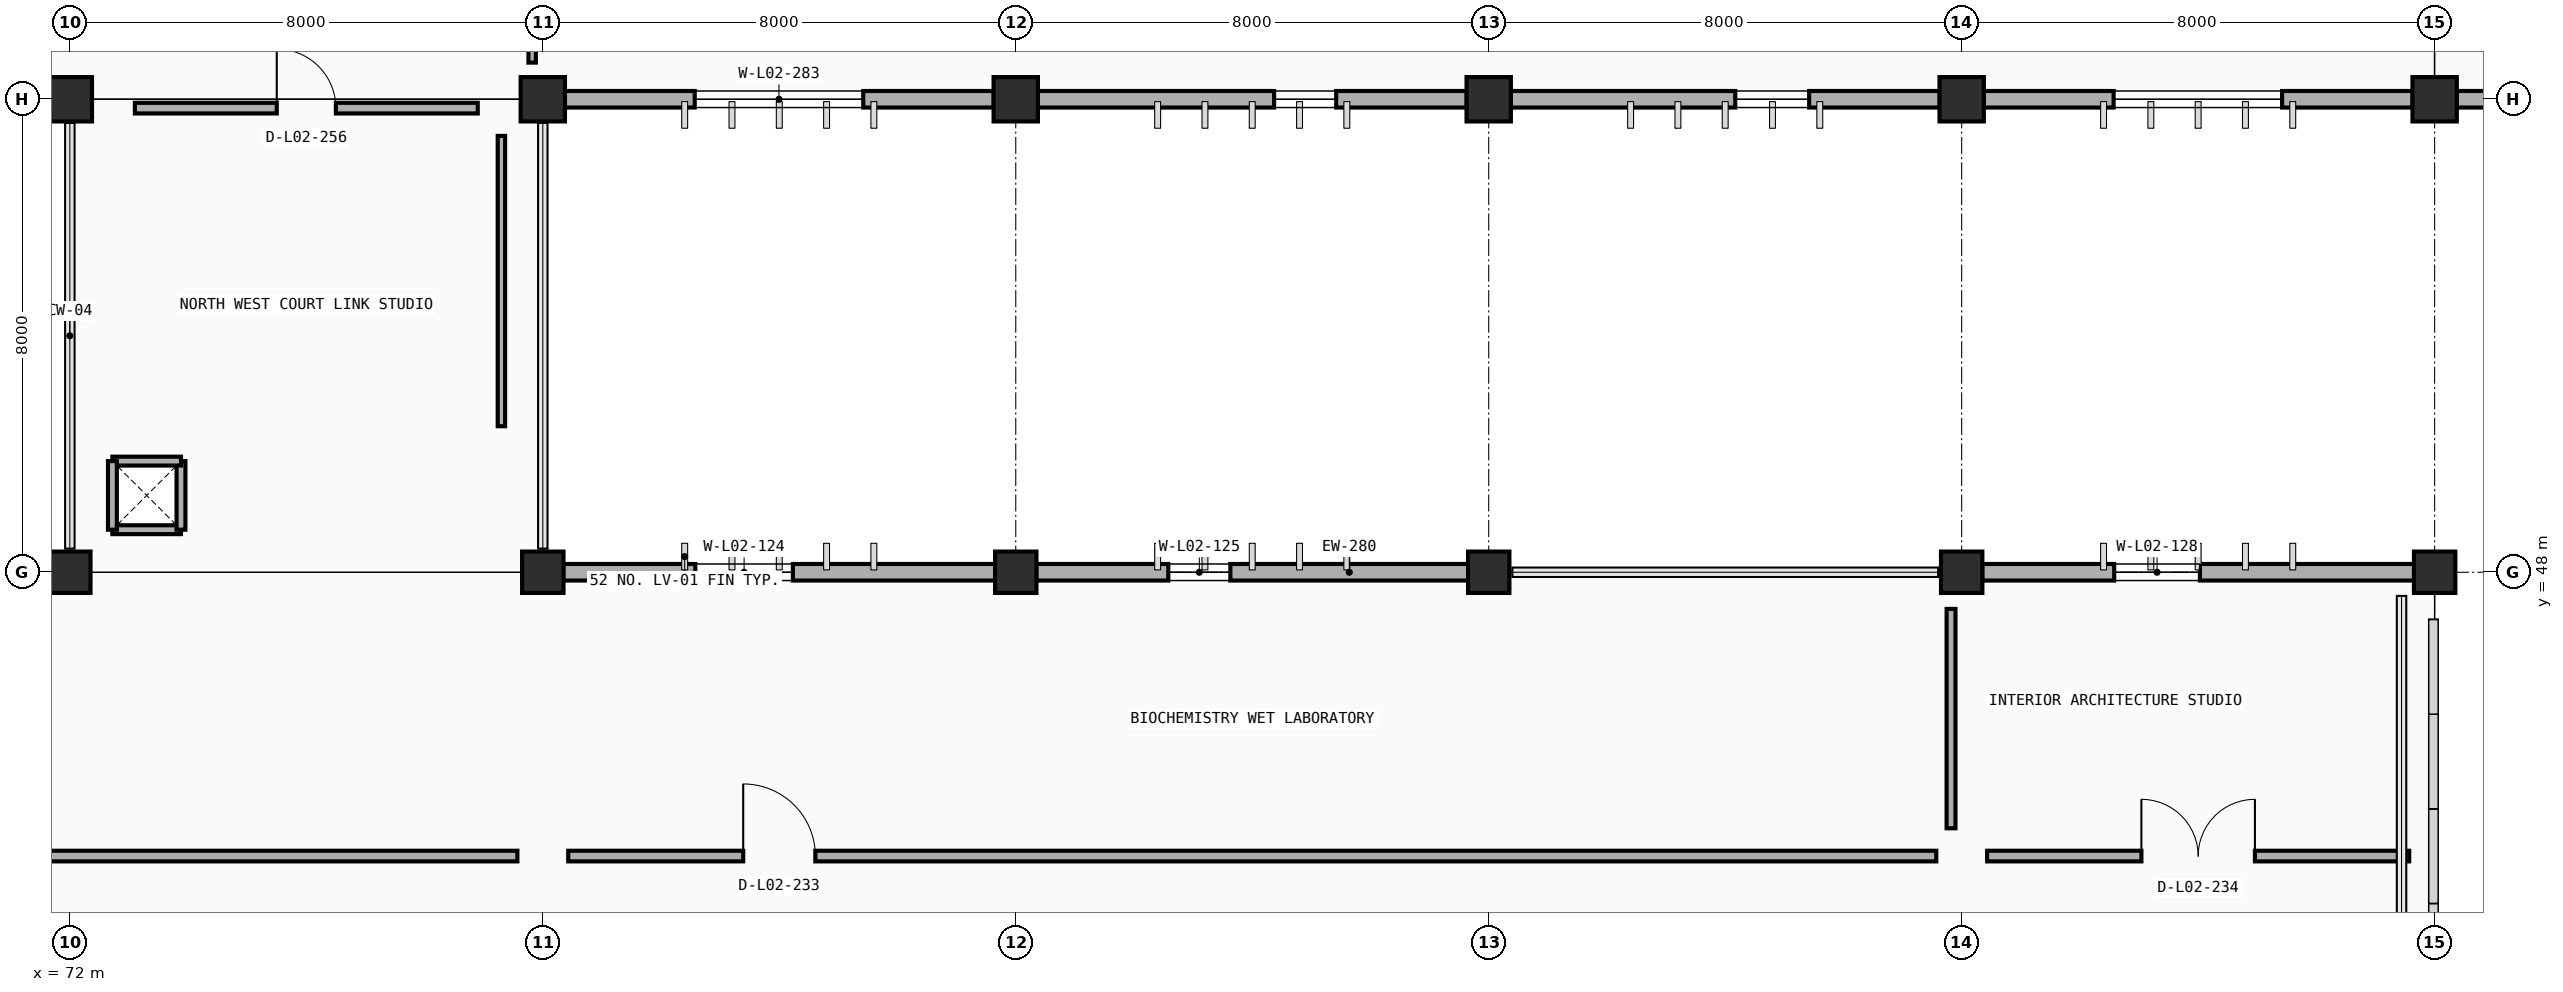
"""IFC4 building model, lengths in metres.
Left out: names, types, materials, properties, quantities, classifications, styles, units other than length and angle.
Written with IfcOpenShell. Run it as: python <this file> out.ifc"""

import sys

from ifc_helpers import new_model, si_unit, direction, frame, frame_2d, origin, origin_2d, place, context, subcontext, project, spatial, rectangle, extrude, element, fill, save


model = new_model("IFC4")
c1 = context("Model", 3, precision=1e-05, world=origin(), true_north=direction((0.0, 1.0)))
c2 = subcontext(c1, "Body", "Model", "MODEL_VIEW")
j1 = project(units=[si_unit("LENGTHUNIT", "METRE"), si_unit("PLANEANGLEUNIT", "RADIAN")], contexts=[c1])
p1 = place(None, origin())
s1 = spatial("IfcSite", under=j1, at=p1, CompositionType="ELEMENT")
p2 = place(p1, origin())
s2 = spatial("IfcBuilding", under=s1, at=p2, CompositionType="ELEMENT")
p3 = place(p2, frame((0.0, 0.0, 4.8)))
s3 = spatial("IfcBuildingStorey", under=s2, at=p3, CompositionType="ELEMENT", Elevation=4.8)
for number, where, z_axis, x_axis in (
    (1, (72.0, 48.0, 0.0), (0.0, 0.0, 1.0), (1.0, 0.0, 0.0)),
    (2, (80.0, 48.0, 0.0), (0.0, 0.0, 1.0), (1.0, 0.0, 0.0)),
    (3, (88.0, 48.0, 0.0), (0.0, 0.0, 1.0), (1.0, 0.0, 0.0)),
    (4, (96.0, 48.0, 0.0), (0.0, 0.0, 1.0), (1.0, 0.0, 0.0)),
    (5, (104.0, 48.0, 0.0), (0.0, 0.0, 1.0), (1.0, 0.0, 0.0)),
    (6, (112.0, 48.0, 0.0), (0.0, 0.0, 1.0), (1.0, 0.0, 0.0)),
):
    element("IfcColumn", number, at=place(p3, frame(where, z_axis=z_axis, x_axis=x_axis)), inside=s3, PredefinedType="COLUMN", context=c2, shape_type="SweptSolid", body=[
        extrude(rectangle(XDim=0.7, YDim=0.7, at=origin_2d()), origin(), (0.0, 0.0, 1.0), 4.8),
    ])
for number, where, z_axis, x_axis in (
    (7, (72.0, 56.0, 0.0), (0.0, 0.0, 1.0), (1.0, 0.0, 0.0)),
    (8, (80.0, 56.0, 0.0), (0.0, 0.0, 1.0), (1.0, 0.0, 0.0)),
    (9, (88.0, 56.0, 0.0), (0.0, 0.0, 1.0), (1.0, 0.0, 0.0)),
    (10, (96.0, 56.0, 0.0), (0.0, 0.0, 1.0), (1.0, 0.0, 0.0)),
    (11, (104.0, 56.0, 0.0), (0.0, 0.0, 1.0), (1.0, 0.0, 0.0)),
    (12, (112.0, 56.0, 0.0), (0.0, 0.0, 1.0), (1.0, 0.0, 0.0)),
):
    element("IfcColumn", number, at=place(p3, frame(where, z_axis=z_axis, x_axis=x_axis)), inside=s3, PredefinedType="COLUMN", context=c2, shape_type="SweptSolid", body=[
        extrude(rectangle(XDim=0.75, YDim=0.75, at=origin_2d()), origin(), (0.0, 0.0, 1.0), 4.8),
    ])
p4 = place(p3, frame((80.347, 48.0, 0.0), z_axis=(0.0, 0.0, 1.0), x_axis=(1.0, 0.0, 0.0)))
e13 = element("IfcWall", 13, at=p4, inside=s3, PredefinedType="STANDARD", context=c2, shape_type="SweptSolid", body=[
    extrude(rectangle(XDim=7.306, YDim=0.28, at=frame_2d((3.653, 0.0))), origin(), (0.0, 0.0, 1.0), 3.91),
])
p5 = place(p4, frame((2.233, 0.0, 0.9)))
e14 = element("IfcOpeningElement", 14, at=p5, cuts=e13, PredefinedType="OPENING", context=c2, shape_type="SweptSolid", body=[
    extrude(rectangle(XDim=1.65, YDim=1.55, at=frame_2d((0.825, 0.775))), frame((0.0, 0.15, 0.0), z_axis=(0.0, -1.0, 0.0), x_axis=(1.0, 0.0, 0.0)), (0.0, 0.0, 1.0), 0.3),
])
p6 = place(p3, frame((88.347, 48.0, 0.0), z_axis=(0.0, 0.0, 1.0), x_axis=(1.0, 0.0, 0.0)))
e15 = element("IfcWall", 15, at=p6, inside=s3, PredefinedType="STANDARD", context=c2, shape_type="SweptSolid", body=[
    extrude(rectangle(XDim=7.306, YDim=0.28, at=frame_2d((3.653, 0.0))), origin(), (0.0, 0.0, 1.0), 3.91),
])
p7 = place(p6, frame((2.233, 0.0, 0.9)))
e16 = element("IfcOpeningElement", 16, at=p7, cuts=e15, PredefinedType="OPENING", context=c2, shape_type="SweptSolid", body=[
    extrude(rectangle(XDim=1.05, YDim=1.55, at=frame_2d((0.525, 0.775))), frame((0.0, 0.15, 0.0), z_axis=(0.0, -1.0, 0.0), x_axis=(1.0, 0.0, 0.0)), (0.0, 0.0, 1.0), 0.3),
])
p8 = place(p3, frame((104.347, 48.0, 0.0), z_axis=(0.0, 0.0, 1.0), x_axis=(1.0, 0.0, 0.0)))
e17 = element("IfcWall", 17, at=p8, inside=s3, PredefinedType="STANDARD", context=c2, shape_type="SweptSolid", body=[
    extrude(rectangle(XDim=7.306, YDim=0.28, at=frame_2d((3.653, 0.0))), origin(), (0.0, 0.0, 1.0), 3.91),
])
p9 = place(p8, frame((2.233, 0.0, 0.9)))
e18 = element("IfcOpeningElement", 18, at=p9, cuts=e17, PredefinedType="OPENING", context=c2, shape_type="SweptSolid", body=[
    extrude(rectangle(XDim=1.45, YDim=1.55, at=frame_2d((0.725, 0.775))), frame((0.0, 0.15, 0.0), z_axis=(0.0, -1.0, 0.0), x_axis=(1.0, 0.0, 0.0)), (0.0, 0.0, 1.0), 0.3),
])
p10 = place(p3, frame((111.76, 47.78, 0.0), z_axis=(0.0, 0.0, 1.0), x_axis=(-1.0, 0.0, 0.0)))
e19 = element("IfcWall", 19, at=p10, inside=s3, PredefinedType="PARAPET", context=c2, shape_type="SweptSolid", body=[
    extrude(rectangle(XDim=0.32, YDim=0.2, at=frame_2d((0.16, 0.0))), origin(), (0.0, 0.0, 1.0), 3.95),
])
p11 = place(p3, frame((87.628, 56.0, 0.0), z_axis=(0.0, 0.0, 1.0), x_axis=(-1.0, 0.0, 0.0)))
e20 = element("IfcWall", 20, at=p11, inside=s3, PredefinedType="STANDARD", context=c2, shape_type="SweptSolid", body=[
    extrude(rectangle(XDim=7.256, YDim=0.28, at=frame_2d((3.628, 0.0))), origin(), (0.0, 0.0, 1.0), 3.91),
])
p12 = place(p11, frame((2.208, 0.0, 0.9)))
e21 = element("IfcOpeningElement", 21, at=p12, cuts=e20, PredefinedType="OPENING", context=c2, shape_type="SweptSolid", body=[
    extrude(rectangle(XDim=2.85, YDim=1.85, at=frame_2d((1.425, 0.925))), frame((0.0, 0.15, 0.0), z_axis=(0.0, -1.0, 0.0), x_axis=(1.0, 0.0, 0.0)), (0.0, 0.0, 1.0), 0.3),
])
p13 = place(p3, frame((95.628, 56.0, 0.0), z_axis=(0.0, 0.0, 1.0), x_axis=(-1.0, 0.0, 0.0)))
e22 = element("IfcWall", 22, at=p13, inside=s3, PredefinedType="STANDARD", context=c2, shape_type="SweptSolid", body=[
    extrude(rectangle(XDim=7.256, YDim=0.28, at=frame_2d((3.628, 0.0))), origin(), (0.0, 0.0, 1.0), 3.91),
])
p14 = place(p13, frame((2.208, 0.0, 0.9)))
e23 = element("IfcOpeningElement", 23, at=p14, cuts=e22, PredefinedType="OPENING", context=c2, shape_type="SweptSolid", body=[
    extrude(rectangle(XDim=1.05, YDim=2.0, at=frame_2d((0.525, 1.0))), frame((0.0, 0.15, 0.0), z_axis=(0.0, -1.0, 0.0), x_axis=(1.0, 0.0, 0.0)), (0.0, 0.0, 1.0), 0.3),
])
p15 = place(p3, frame((103.628, 56.0, 0.0), z_axis=(0.0, 0.0, 1.0), x_axis=(-1.0, 0.0, 0.0)))
e24 = element("IfcWall", 24, at=p15, inside=s3, PredefinedType="STANDARD", context=c2, shape_type="SweptSolid", body=[
    extrude(rectangle(XDim=7.256, YDim=0.28, at=frame_2d((3.628, 0.0))), origin(), (0.0, 0.0, 1.0), 3.91),
])
p16 = place(p15, frame((2.208, 0.0, 0.9)))
e25 = element("IfcOpeningElement", 25, at=p16, cuts=e24, PredefinedType="OPENING", context=c2, shape_type="SweptSolid", body=[
    extrude(rectangle(XDim=1.25, YDim=2.0, at=frame_2d((0.625, 1.0))), frame((0.0, 0.15, 0.0), z_axis=(0.0, -1.0, 0.0), x_axis=(1.0, 0.0, 0.0)), (0.0, 0.0, 1.0), 0.3),
])
p17 = place(p3, frame((111.628, 56.0, 0.0), z_axis=(0.0, 0.0, 1.0), x_axis=(-1.0, 0.0, 0.0)))
e26 = element("IfcWall", 26, at=p17, inside=s3, PredefinedType="STANDARD", context=c2, shape_type="SweptSolid", body=[
    extrude(rectangle(XDim=7.256, YDim=0.28, at=frame_2d((3.628, 0.0))), origin(), (0.0, 0.0, 1.0), 3.91),
])
p18 = place(p17, frame((2.208, 0.0, 0.9)))
e27 = element("IfcOpeningElement", 27, at=p18, cuts=e26, PredefinedType="OPENING", context=c2, shape_type="SweptSolid", body=[
    extrude(rectangle(XDim=2.85, YDim=1.85, at=frame_2d((1.425, 0.925))), frame((0.0, 0.15, 0.0), z_axis=(0.0, -1.0, 0.0), x_axis=(1.0, 0.0, 0.0)), (0.0, 0.0, 1.0), 0.3),
])
p19 = place(p3, frame((119.628, 56.0, 0.0), z_axis=(0.0, 0.0, 1.0), x_axis=(-1.0, 0.0, 0.0)))
e28 = element("IfcWall", 28, at=p19, inside=s3, PredefinedType="STANDARD", context=c2, shape_type="SweptSolid", body=[
    extrude(rectangle(XDim=7.256, YDim=0.28, at=frame_2d((3.628, 0.0))), origin(), (0.0, 0.0, 1.0), 3.91),
])
p20 = place(p19, frame((2.208, 0.0, 0.9)))
e29 = element("IfcOpeningElement", 29, at=p20, cuts=e28, PredefinedType="OPENING", context=c2, shape_type="SweptSolid", body=[
    extrude(rectangle(XDim=1.05, YDim=2.0, at=frame_2d((0.525, 1.0))), frame((0.0, 0.15, 0.0), z_axis=(0.0, -1.0, 0.0), x_axis=(1.0, 0.0, 0.0)), (0.0, 0.0, 1.0), 0.3),
])
for number, where, z_axis, x_axis in (
    (30, (72.72, 48.72, 0.0), (0.0, 0.0, 1.0), (1.0, 0.0, 0.0)),
    (31, (73.88, 48.72, 0.0), (0.0, 0.0, 1.0), (0.0, 1.0, 0.0)),
    (32, (73.88, 49.88, 0.0), (0.0, 0.0, 1.0), (-1.0, 0.0, 0.0)),
    (33, (72.72, 49.88, 0.0), (0.0, 0.0, 1.0), (0.0, -1.0, 0.0)),
):
    element("IfcWall", number, at=place(p3, frame(where, z_axis=z_axis, x_axis=x_axis)), inside=s3, PredefinedType="PARTITIONING", context=c2, shape_type="SweptSolid", body=[
        extrude(rectangle(XDim=1.16, YDim=0.15, at=frame_2d((0.58, 0.0))), origin(), (0.0, 0.0, 1.0), 4.5),
    ])
p21 = place(p3, frame((56.43, 43.2, 0.0), z_axis=(0.0, 0.0, 1.0), x_axis=(1.0, 0.0, 0.0)))
e34 = element("IfcWall", 34, at=p21, inside=s3, PredefinedType="PARTITIONING", context=c2, shape_type="SweptSolid", body=[
    extrude(rectangle(XDim=23.14, YDim=0.18, at=frame_2d((11.57, 0.0))), origin(), (0.0, 0.0, 1.0), 3.9),
])
p22 = place(p21, frame((2.995, 0.0, 0.0)))
e35 = element("IfcOpeningElement", 35, at=p22, cuts=e34, PredefinedType="OPENING", context=c2, shape_type="SweptSolid", body=[
    extrude(rectangle(XDim=1.15, YDim=2.15, at=frame_2d((0.575, 1.075))), frame((0.0, 0.1, 0.0), z_axis=(0.0, -1.0, 0.0), x_axis=(1.0, 0.0, 0.0)), (0.0, 0.0, 1.0), 0.2),
])
p23 = place(p3, frame((80.43, 43.2, 0.0), z_axis=(0.0, 0.0, 1.0), x_axis=(1.0, 0.0, 0.0)))
e36 = element("IfcWall", 36, at=p23, inside=s3, PredefinedType="PARTITIONING", context=c2, shape_type="SweptSolid", body=[
    extrude(rectangle(XDim=23.14, YDim=0.18, at=frame_2d((11.57, 0.0))), origin(), (0.0, 0.0, 1.0), 3.9),
])
p24 = place(p23, frame((2.96, 0.0, 0.0)))
e37 = element("IfcOpeningElement", 37, at=p24, cuts=e36, PredefinedType="OPENING", context=c2, shape_type="SweptSolid", body=[
    extrude(rectangle(XDim=1.22, YDim=2.18, at=frame_2d((0.61, 1.09))), frame((0.0, 0.1, 0.0), z_axis=(0.0, -1.0, 0.0), x_axis=(1.0, 0.0, 0.0)), (0.0, 0.0, 1.0), 0.2),
])
p25 = place(p3, frame((103.82, 43.67, 0.0), z_axis=(0.0, 0.0, 1.0), x_axis=(0.0, 1.0, 0.0)))
e38 = element("IfcWall", 38, at=p25, inside=s3, PredefinedType="PARTITIONING", context=c2, shape_type="SweptSolid", body=[
    extrude(rectangle(XDim=3.71, YDim=0.15, at=frame_2d((1.855, 0.0))), origin(), (0.0, 0.0, 1.0), 3.76),
])
p26 = place(p3, frame((104.43, 43.2, 0.0), z_axis=(0.0, 0.0, 1.0), x_axis=(1.0, 0.0, 0.0)))
e39 = element("IfcWall", 39, at=p26, inside=s3, PredefinedType="PARTITIONING", context=c2, shape_type="SweptSolid", body=[
    extrude(rectangle(XDim=7.14, YDim=0.18, at=frame_2d((3.57, 0.0))), origin(), (0.0, 0.0, 1.0), 3.9),
])
p27 = place(p26, frame((2.61, 0.0, 0.0)))
e40 = element("IfcOpeningElement", 40, at=p27, cuts=e39, PredefinedType="OPENING", context=c2, shape_type="SweptSolid", body=[
    extrude(rectangle(XDim=1.92, YDim=2.3, at=frame_2d((0.96, 1.15))), frame((0.0, 0.1, 0.0), z_axis=(0.0, -1.0, 0.0), x_axis=(1.0, 0.0, 0.0)), (0.0, 0.0, 1.0), 0.2),
])
p28 = place(p3, frame((79.82, 56.62, 0.0), z_axis=(0.0, 0.0, 1.0), x_axis=(0.0, 1.0, 0.0)))
e41 = element("IfcWall", 41, at=p28, inside=s3, PredefinedType="PARTITIONING", context=c2, shape_type="SweptSolid", body=[
    extrude(rectangle(XDim=6.81, YDim=0.125, at=frame_2d((3.405, 0.0))), origin(), (0.0, 0.0, 1.0), 3.76),
])
p29 = place(p3, frame((73.1, 55.85, 0.0), z_axis=(0.0, 0.0, 1.0), x_axis=(1.0, 0.0, 0.0)))
e42 = element("IfcWall", 42, at=p29, inside=s3, PredefinedType="PARTITIONING", context=c2, shape_type="SweptSolid", body=[
    extrude(rectangle(XDim=5.8, YDim=0.18, at=frame_2d((2.9, 0.0))), origin(), (0.0, 0.0, 1.0), 3.9),
])
p30 = place(p29, frame((2.4, 0.0, 0.0)))
e43 = element("IfcOpeningElement", 43, at=p30, cuts=e42, PredefinedType="OPENING", context=c2, shape_type="SweptSolid", body=[
    extrude(rectangle(XDim=1.0, YDim=2.15, at=frame_2d((0.5, 1.075))), frame((0.0, 0.1, 0.0), z_axis=(0.0, -1.0, 0.0), x_axis=(1.0, 0.0, 0.0)), (0.0, 0.0, 1.0), 0.2),
])
p31 = place(p3, frame((79.3, 50.47, 0.0), z_axis=(0.0, 0.0, 1.0), x_axis=(0.0, 1.0, 0.0)))
e44 = element("IfcWall", 44, at=p31, inside=s3, PredefinedType="PARTITIONING", context=c2, shape_type="SweptSolid", body=[
    extrude(rectangle(XDim=4.91, YDim=0.125, at=frame_2d((2.455, 0.0))), origin(), (0.0, 0.0, 1.0), 3.9),
])
p32 = place(p5, origin())
e45 = element("IfcWindow", 45, at=p32, inside=s3, PartitioningType="DOUBLE_PANEL_VERTICAL", PredefinedType="WINDOW", context=c2, shape_type="SweptSolid", body=[
    extrude(rectangle(XDim=1.65, YDim=1.55, at=frame_2d((0.825, 0.775))), frame((0.0, 0.03, 0.0), z_axis=(0.0, -1.0, 0.0), x_axis=(1.0, 0.0, 0.0)), (0.0, 0.0, 1.0), 0.06),
])
fill(e14, e45)
p33 = place(p7, origin())
e46 = element("IfcWindow", 46, at=p33, inside=s3, PartitioningType="SINGLE_PANEL", PredefinedType="WINDOW", context=c2, shape_type="SweptSolid", body=[
    extrude(rectangle(XDim=1.05, YDim=1.55, at=frame_2d((0.525, 0.775))), frame((0.0, 0.03, 0.0), z_axis=(0.0, -1.0, 0.0), x_axis=(1.0, 0.0, 0.0)), (0.0, 0.0, 1.0), 0.06),
])
fill(e16, e46)
p34 = place(p9, origin())
e47 = element("IfcWindow", 47, at=p34, inside=s3, PartitioningType="SINGLE_PANEL", PredefinedType="WINDOW", context=c2, shape_type="SweptSolid", body=[
    extrude(rectangle(XDim=1.45, YDim=1.55, at=frame_2d((0.725, 0.775))), frame((0.0, 0.03, 0.0), z_axis=(0.0, -1.0, 0.0), x_axis=(1.0, 0.0, 0.0)), (0.0, 0.0, 1.0), 0.06),
])
fill(e18, e47)
p35 = place(p12, origin())
e48 = element("IfcWindow", 48, at=p35, inside=s3, PartitioningType="DOUBLE_PANEL_VERTICAL", PredefinedType="WINDOW", context=c2, shape_type="SweptSolid", body=[
    extrude(rectangle(XDim=2.85, YDim=1.85, at=frame_2d((1.425, 0.925))), frame((0.0, 0.03, 0.0), z_axis=(0.0, -1.0, 0.0), x_axis=(1.0, 0.0, 0.0)), (0.0, 0.0, 1.0), 0.06),
])
fill(e21, e48)
p36 = place(p14, origin())
e49 = element("IfcWindow", 49, at=p36, inside=s3, PartitioningType="SINGLE_PANEL", PredefinedType="WINDOW", context=c2, shape_type="SweptSolid", body=[
    extrude(rectangle(XDim=1.05, YDim=2.0, at=frame_2d((0.525, 1.0))), frame((0.0, 0.03, 0.0), z_axis=(0.0, -1.0, 0.0), x_axis=(1.0, 0.0, 0.0)), (0.0, 0.0, 1.0), 0.06),
])
fill(e23, e49)
p37 = place(p16, origin())
e50 = element("IfcWindow", 50, at=p37, inside=s3, PartitioningType="SINGLE_PANEL", PredefinedType="WINDOW", context=c2, shape_type="SweptSolid", body=[
    extrude(rectangle(XDim=1.25, YDim=2.0, at=frame_2d((0.625, 1.0))), frame((0.0, 0.03, 0.0), z_axis=(0.0, -1.0, 0.0), x_axis=(1.0, 0.0, 0.0)), (0.0, 0.0, 1.0), 0.06),
])
fill(e25, e50)
p38 = place(p18, origin())
e51 = element("IfcWindow", 51, at=p38, inside=s3, PartitioningType="DOUBLE_PANEL_VERTICAL", PredefinedType="WINDOW", context=c2, shape_type="SweptSolid", body=[
    extrude(rectangle(XDim=2.85, YDim=1.85, at=frame_2d((1.425, 0.925))), frame((0.0, 0.03, 0.0), z_axis=(0.0, -1.0, 0.0), x_axis=(1.0, 0.0, 0.0)), (0.0, 0.0, 1.0), 0.06),
])
fill(e27, e51)
p39 = place(p24, origin())
e52 = element("IfcDoor", 52, at=p39, inside=s3, OperationType="SINGLE_SWING_LEFT", PredefinedType="DOOR", context=c2, shape_type="SweptSolid", body=[
    extrude(rectangle(XDim=1.22, YDim=2.18, at=frame_2d((0.61, 1.09))), frame((0.0, 0.025, 0.0), z_axis=(0.0, -1.0, 0.0), x_axis=(1.0, 0.0, 0.0)), (0.0, 0.0, 1.0), 0.05),
])
fill(e37, e52)
p40 = place(p27, origin())
e53 = element("IfcDoor", 53, at=p40, inside=s3, OperationType="DOUBLE_DOOR_SINGLE_SWING", PredefinedType="DOOR", context=c2, shape_type="SweptSolid", body=[
    extrude(rectangle(XDim=1.92, YDim=2.3, at=frame_2d((0.96, 1.15))), frame((0.0, 0.025, 0.0), z_axis=(0.0, -1.0, 0.0), x_axis=(1.0, 0.0, 0.0)), (0.0, 0.0, 1.0), 0.05),
])
fill(e40, e53)
p41 = place(p30, origin())
e54 = element("IfcDoor", 54, at=p41, inside=s3, OperationType="SINGLE_SWING_LEFT", PredefinedType="DOOR", context=c2, shape_type="SweptSolid", body=[
    extrude(rectangle(XDim=1.0, YDim=2.15, at=frame_2d((0.5, 1.075))), frame((0.0, 0.025, 0.0), z_axis=(0.0, -1.0, 0.0), x_axis=(1.0, 0.0, 0.0)), (0.0, 0.0, 1.0), 0.05),
])
fill(e43, e54)
save(model, sys.argv[1])
